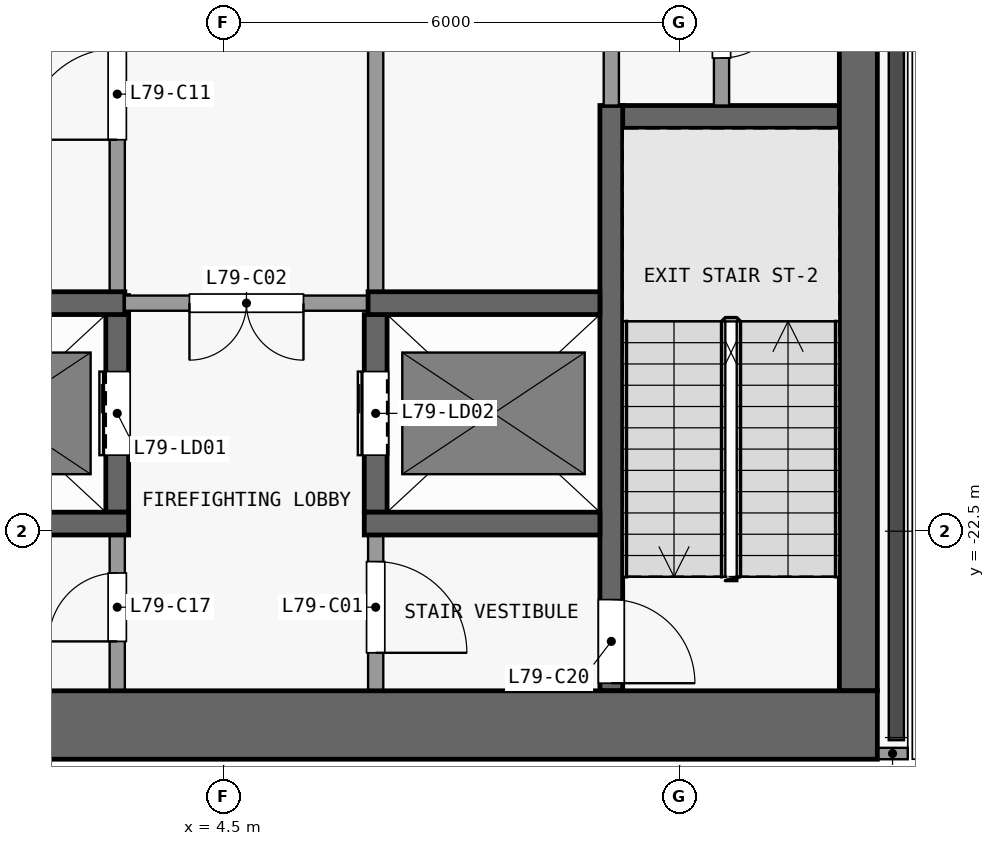
"""IFC4 building model, lengths in metres.
Left out: names, types, materials, properties, quantities, classifications, styles, units other than length and angle.
Written with IfcOpenShell. Run it as: python <this file> out.ifc"""

import sys

from ifc_helpers import new_model, si_unit, direction, frame, frame_2d, origin, place, context, subcontext, project, spatial, rectangle, extrude, element, fill, save


model = new_model("IFC4")
c1 = context("Model", 3, precision=1e-05, world=origin(), true_north=direction((0.0, 1.0)))
c2 = subcontext(c1, "Body", "Model", "MODEL_VIEW")
j1 = project(units=[si_unit("LENGTHUNIT", "METRE"), si_unit("PLANEANGLEUNIT", "RADIAN")], contexts=[c1])
p1 = place(None, origin())
s1 = spatial("IfcSite", under=j1, at=p1, CompositionType="ELEMENT")
p2 = place(p1, origin())
s2 = spatial("IfcBuilding", under=s1, at=p2, CompositionType="ELEMENT")
p3 = place(p2, frame((0.0, 0.0, 312.2)))
s3 = spatial("IfcBuildingStorey", under=s2, at=p3, CompositionType="ELEMENT", Elevation=312.2)
p4 = place(p3, frame((-13.1, -25.05, 0.0), z_axis=(0.0, 0.0, 1.0), x_axis=(1.0, 0.0, 0.0)))
e1 = element("IfcWall", 1, at=p4, inside=s3, PredefinedType="SHEAR", context=c2, shape_type="SweptSolid", body=[
    extrude(rectangle(XDim=26.2, YDim=0.9, at=frame_2d((13.1, 0.0))), origin(), (0.0, 0.0, 1.0), 4.2),
])
p5 = place(p3, frame((12.85, -24.6, 0.0), z_axis=(0.0, 0.0, 1.0), x_axis=(0.0, 1.0, 0.0)))
e2 = element("IfcWall", 2, at=p5, inside=s3, PredefinedType="SHEAR", context=c2, shape_type="SweptSolid", body=[
    extrude(rectangle(XDim=16.1, YDim=0.5, at=frame_2d((8.05, 0.0))), origin(), (0.0, 0.0, 1.0), 4.2),
])
p6 = place(p3, frame((-3.25, -22.4, 0.0), z_axis=(0.0, 0.0, 1.0), x_axis=(1.0, 0.0, 0.0)))
e3 = element("IfcWall", 3, at=p6, inside=s3, PredefinedType="SHEAR", context=c2, shape_type="SweptSolid", body=[
    extrude(rectangle(XDim=6.5, YDim=0.3, at=frame_2d((3.25, 0.0))), origin(), (0.0, 0.0, 1.0), 4.2),
])
p7 = place(p3, frame((6.35, -22.4, 0.0), z_axis=(0.0, 0.0, 1.0), x_axis=(1.0, 0.0, 0.0)))
e4 = element("IfcWall", 4, at=p7, inside=s3, PredefinedType="SHEAR", context=c2, shape_type="SweptSolid", body=[
    extrude(rectangle(XDim=3.1, YDim=0.3, at=frame_2d((1.55, 0.0))), origin(), (0.0, 0.0, 1.0), 4.2),
])
p8 = place(p3, frame((-0.1, -19.5, 0.0), z_axis=(0.0, 0.0, 1.0), x_axis=(1.0, 0.0, 0.0)))
e5 = element("IfcWall", 5, at=p8, inside=s3, PredefinedType="SHEAR", context=c2, shape_type="SweptSolid", body=[
    extrude(rectangle(XDim=3.3, YDim=0.3, at=frame_2d((1.65, 0.0))), origin(), (0.0, 0.0, 1.0), 4.2),
])
p9 = place(p3, frame((6.4, -19.5, 0.0), z_axis=(0.0, 0.0, 1.0), x_axis=(-1.0, 0.0, 0.0)))
e6 = element("IfcWall", 6, at=p9, inside=s3, PredefinedType="PARTITIONING", context=c2, shape_type="SweptSolid", body=[
    extrude(rectangle(XDim=3.2, YDim=0.2, at=frame_2d((1.6, 0.0))), origin(), (0.0, 0.0, 1.0), 4.2),
])
p10 = place(p9, frame((0.85, 0.0, 0.0)))
e7 = element("IfcOpeningElement", 7, at=p10, cuts=e6, PredefinedType="OPENING", context=c2, shape_type="SweptSolid", body=[
    extrude(rectangle(XDim=1.5, YDim=2.1, at=frame_2d((0.75, 1.05))), frame((0.0, 0.11, 0.0), z_axis=(0.0, -1.0, 0.0), x_axis=(1.0, 0.0, 0.0)), (0.0, 0.0, 1.0), 0.22),
])
p11 = place(p3, frame((6.4, -19.5, 0.0), z_axis=(0.0, 0.0, 1.0), x_axis=(1.0, 0.0, 0.0)))
e8 = element("IfcWall", 8, at=p11, inside=s3, PredefinedType="SHEAR", context=c2, shape_type="SweptSolid", body=[
    extrude(rectangle(XDim=3.05, YDim=0.3, at=frame_2d((1.525, 0.0))), origin(), (0.0, 0.0, 1.0), 4.2),
])
p12 = place(p3, frame((9.5, -17.05, 0.0), z_axis=(0.0, 0.0, 1.0), x_axis=(1.0, 0.0, 0.0)))
e9 = element("IfcWall", 9, at=p12, inside=s3, PredefinedType="SHEAR", context=c2, shape_type="SweptSolid", body=[
    extrude(rectangle(XDim=3.1, YDim=0.3, at=frame_2d((1.55, 0.0))), origin(), (0.0, 0.0, 1.0), 4.2),
])
p13 = place(p3, frame((3.1, -24.6, 0.0), z_axis=(0.0, 0.0, 1.0), x_axis=(0.0, 1.0, 0.0)))
e10 = element("IfcWall", 10, at=p13, inside=s3, PredefinedType="PARTITIONING", context=c2, shape_type="SweptSolid", body=[
    extrude(rectangle(XDim=2.05, YDim=0.2, at=frame_2d((1.025, 0.0))), origin(), (0.0, 0.0, 1.0), 4.2),
])
p14 = place(p13, frame((0.65, 0.0, 0.0)))
e11 = element("IfcOpeningElement", 11, at=p14, cuts=e10, PredefinedType="OPENING", context=c2, shape_type="SweptSolid", body=[
    extrude(rectangle(XDim=0.9, YDim=2.1, at=frame_2d((0.45, 1.05))), frame((0.0, 0.11, 0.0), z_axis=(0.0, -1.0, 0.0), x_axis=(1.0, 0.0, 0.0)), (0.0, 0.0, 1.0), 0.22),
])
p15 = place(p3, frame((3.1, -22.25, 0.0), z_axis=(0.0, 0.0, 1.0), x_axis=(0.0, 1.0, 0.0)))
e12 = element("IfcWall", 12, at=p15, inside=s3, PredefinedType="SHEAR", context=c2, shape_type="SweptSolid", body=[
    extrude(rectangle(XDim=2.85, YDim=0.3, at=frame_2d((1.425, 0.0))), origin(), (0.0, 0.0, 1.0), 4.2),
])
p16 = place(p15, frame((0.75, 0.0, 0.0)))
e13 = element("IfcOpeningElement", 13, at=p16, cuts=e12, PredefinedType="OPENING", context=c2, shape_type="SweptSolid", body=[
    extrude(rectangle(XDim=1.1, YDim=2.1, at=frame_2d((0.55, 1.05))), frame((0.0, 0.16, 0.0), z_axis=(0.0, -1.0, 0.0), x_axis=(1.0, 0.0, 0.0)), (0.0, 0.0, 1.0), 0.32),
])
p17 = place(p3, frame((3.1, -19.6, 0.0), z_axis=(0.0, 0.0, 1.0), x_axis=(0.0, 1.0, 0.0)))
e14 = element("IfcWall", 14, at=p17, inside=s3, PredefinedType="PARTITIONING", context=c2, shape_type="SweptSolid", body=[
    extrude(rectangle(XDim=11.1, YDim=0.2, at=frame_2d((5.55, 0.0))), origin(), (0.0, 0.0, 1.0), 4.2),
])
p18 = place(p17, frame((2.25, 0.0, 0.0)))
e15 = element("IfcOpeningElement", 15, at=p18, cuts=e14, PredefinedType="OPENING", context=c2, shape_type="SweptSolid", body=[
    extrude(rectangle(XDim=1.2, YDim=2.1, at=frame_2d((0.6, 1.05))), frame((0.0, 0.11, 0.0), z_axis=(0.0, -1.0, 0.0), x_axis=(1.0, 0.0, 0.0)), (0.0, 0.0, 1.0), 0.22),
])
p19 = place(p17, frame((7.75, 0.0, 0.0)))
e16 = element("IfcOpeningElement", 16, at=p19, cuts=e14, PredefinedType="OPENING", context=c2, shape_type="SweptSolid", body=[
    extrude(rectangle(XDim=1.2, YDim=2.1, at=frame_2d((0.6, 1.05))), frame((0.0, 0.11, 0.0), z_axis=(0.0, -1.0, 0.0), x_axis=(1.0, 0.0, 0.0)), (0.0, 0.0, 1.0), 0.22),
])
p20 = place(p3, frame((6.5, -22.55, 0.0), z_axis=(0.0, 0.0, 1.0), x_axis=(0.0, -1.0, 0.0)))
e17 = element("IfcWall", 17, at=p20, inside=s3, PredefinedType="PARTITIONING", context=c2, shape_type="SweptSolid", body=[
    extrude(rectangle(XDim=2.05, YDim=0.2, at=frame_2d((1.025, 0.0))), origin(), (0.0, 0.0, 1.0), 4.2),
])
p21 = place(p20, frame((0.35, 0.0, 0.0)))
e18 = element("IfcOpeningElement", 18, at=p21, cuts=e17, PredefinedType="OPENING", context=c2, shape_type="SweptSolid", body=[
    extrude(rectangle(XDim=1.2, YDim=2.1, at=frame_2d((0.6, 1.05))), frame((0.0, 0.11, 0.0), z_axis=(0.0, -1.0, 0.0), x_axis=(1.0, 0.0, 0.0)), (0.0, 0.0, 1.0), 0.22),
])
p22 = place(p3, frame((6.5, -22.25, 0.0), z_axis=(0.0, 0.0, 1.0), x_axis=(0.0, 1.0, 0.0)))
e19 = element("IfcWall", 19, at=p22, inside=s3, PredefinedType="SHEAR", context=c2, shape_type="SweptSolid", body=[
    extrude(rectangle(XDim=2.6, YDim=0.3, at=frame_2d((1.3, 0.0))), origin(), (0.0, 0.0, 1.0), 4.2),
])
p23 = place(p22, frame((0.75, 0.0, 0.0)))
e20 = element("IfcOpeningElement", 20, at=p23, cuts=e19, PredefinedType="OPENING", context=c2, shape_type="SweptSolid", body=[
    extrude(rectangle(XDim=1.1, YDim=2.1, at=frame_2d((0.55, 1.05))), frame((0.0, 0.16, 0.0), z_axis=(0.0, -1.0, 0.0), x_axis=(1.0, 0.0, 0.0)), (0.0, 0.0, 1.0), 0.32),
])
p24 = place(p3, frame((6.5, -8.5, 0.0), z_axis=(0.0, 0.0, 1.0), x_axis=(0.0, -1.0, 0.0)))
e21 = element("IfcWall", 21, at=p24, inside=s3, PredefinedType="PARTITIONING", context=c2, shape_type="SweptSolid", body=[
    extrude(rectangle(XDim=10.85, YDim=0.2, at=frame_2d((5.425, 0.0))), origin(), (0.0, 0.0, 1.0), 4.2),
])
p25 = place(p24, frame((6.275, 0.0, 0.0)))
e22 = element("IfcOpeningElement", 22, at=p25, cuts=e21, PredefinedType="OPENING", context=c2, shape_type="SweptSolid", body=[
    extrude(rectangle(XDim=1.2, YDim=2.1, at=frame_2d((0.6, 1.05))), frame((0.0, 0.11, 0.0), z_axis=(0.0, -1.0, 0.0), x_axis=(1.0, 0.0, 0.0)), (0.0, 0.0, 1.0), 0.22),
])
p26 = place(p24, frame((0.925, 0.0, 0.0)))
e23 = element("IfcOpeningElement", 23, at=p26, cuts=e21, PredefinedType="OPENING", context=c2, shape_type="SweptSolid", body=[
    extrude(rectangle(XDim=0.9, YDim=2.1, at=frame_2d((0.45, 1.05))), frame((0.0, 0.11, 0.0), z_axis=(0.0, -1.0, 0.0), x_axis=(1.0, 0.0, 0.0)), (0.0, 0.0, 1.0), 0.22),
])
p27 = place(p3, frame((9.6, -16.9, 0.0), z_axis=(0.0, 0.0, 1.0), x_axis=(0.0, -1.0, 0.0)))
e24 = element("IfcWall", 24, at=p27, inside=s3, PredefinedType="SHEAR", context=c2, shape_type="SweptSolid", body=[
    extrude(rectangle(XDim=7.7, YDim=0.3, at=frame_2d((3.85, 0.0))), origin(), (0.0, 0.0, 1.0), 4.2),
])
p28 = place(p27, frame((6.5, 0.0, 0.0)))
e25 = element("IfcOpeningElement", 25, at=p28, cuts=e24, PredefinedType="OPENING", context=c2, shape_type="SweptSolid", body=[
    extrude(rectangle(XDim=1.1, YDim=2.1, at=frame_2d((0.55, 1.05))), frame((0.0, 0.16, 0.0), z_axis=(0.0, -1.0, 0.0), x_axis=(1.0, 0.0, 0.0)), (0.0, 0.0, 1.0), 0.32),
])
p29 = place(p3, frame((9.6, -16.9, 0.0), z_axis=(0.0, 0.0, 1.0), x_axis=(0.0, 1.0, 0.0)))
e26 = element("IfcWall", 26, at=p29, inside=s3, PredefinedType="PARTITIONING", context=c2, shape_type="SweptSolid", body=[
    extrude(rectangle(XDim=8.4, YDim=0.2, at=frame_2d((4.2, 0.0))), origin(), (0.0, 0.0, 1.0), 4.2),
])
p30 = place(p3, frame((11.05, -14.5, 0.0), z_axis=(0.0, 0.0, 1.0), x_axis=(0.0, -1.0, 0.0)))
e27 = element("IfcWall", 27, at=p30, inside=s3, PredefinedType="PARTITIONING", context=c2, shape_type="SweptSolid", body=[
    extrude(rectangle(XDim=2.4, YDim=0.2, at=frame_2d((1.2, 0.0))), origin(), (0.0, 0.0, 1.0), 4.2),
])
p31 = place(p30, frame((0.875, 0.0, 0.0)))
e28 = element("IfcOpeningElement", 28, at=p31, cuts=e27, PredefinedType="OPENING", context=c2, shape_type="SweptSolid", body=[
    extrude(rectangle(XDim=0.9, YDim=2.1, at=frame_2d((0.45, 1.05))), frame((0.0, 0.11, 0.0), z_axis=(0.0, -1.0, 0.0), x_axis=(1.0, 0.0, 0.0)), (0.0, 0.0, 1.0), 0.22),
])
p32 = place(p3, frame((13.5, -25.425, 0.0), z_axis=(0.0, 0.0, 1.0), x_axis=(-1.0, 0.0, 0.0)))
e29 = element("IfcWall", 29, at=p32, inside=s3, PredefinedType="SOLIDWALL", context=c2, shape_type="SweptSolid", body=[
    extrude(rectangle(XDim=0.4, YDim=0.15, at=frame_2d((0.2, 0.0))), origin(), (0.0, 0.0, 1.0), 4.2),
])
p33 = place(p16, origin())
e30 = element("IfcDoor", 30, at=p33, inside=s3, OperationType="DOUBLE_DOOR_SLIDING", PredefinedType="DOOR", context=c2, shape_type="SweptSolid", body=[
    extrude(rectangle(XDim=1.1, YDim=2.1, at=frame_2d((0.55, 1.05))), frame((0.0, 0.025, 0.0), z_axis=(0.0, -1.0, 0.0), x_axis=(1.0, 0.0, 0.0)), (0.0, 0.0, 1.0), 0.05),
])
fill(e13, e30)
p34 = place(p23, origin())
e31 = element("IfcDoor", 31, at=p34, inside=s3, OperationType="DOUBLE_DOOR_SLIDING", PredefinedType="DOOR", context=c2, shape_type="SweptSolid", body=[
    extrude(rectangle(XDim=1.1, YDim=2.1, at=frame_2d((0.55, 1.05))), frame((0.0, 0.025, 0.0), z_axis=(0.0, -1.0, 0.0), x_axis=(1.0, 0.0, 0.0)), (0.0, 0.0, 1.0), 0.05),
])
fill(e20, e31)
p35 = place(p21, origin())
e32 = element("IfcDoor", 32, at=p35, inside=s3, OperationType="SINGLE_SWING_RIGHT", PredefinedType="DOOR", context=c2, shape_type="SweptSolid", body=[
    extrude(rectangle(XDim=1.2, YDim=2.1, at=frame_2d((0.6, 1.05))), frame((0.0, 0.025, 0.0), z_axis=(0.0, -1.0, 0.0), x_axis=(1.0, 0.0, 0.0)), (0.0, 0.0, 1.0), 0.05),
])
fill(e18, e32)
p36 = place(p10, origin())
e33 = element("IfcDoor", 33, at=p36, inside=s3, OperationType="DOUBLE_DOOR_SINGLE_SWING", PredefinedType="DOOR", context=c2, shape_type="SweptSolid", body=[
    extrude(rectangle(XDim=1.5, YDim=2.1, at=frame_2d((0.75, 1.05))), frame((0.0, 0.025, 0.0), z_axis=(0.0, -1.0, 0.0), x_axis=(1.0, 0.0, 0.0)), (0.0, 0.0, 1.0), 0.05),
])
fill(e7, e33)
p37 = place(p18, origin())
e34 = element("IfcDoor", 34, at=p37, inside=s3, OperationType="SINGLE_SWING_LEFT", PredefinedType="DOOR", context=c2, shape_type="SweptSolid", body=[
    extrude(rectangle(XDim=1.2, YDim=2.1, at=frame_2d((0.6, 1.05))), frame((0.0, 0.025, 0.0), z_axis=(0.0, -1.0, 0.0), x_axis=(1.0, 0.0, 0.0)), (0.0, 0.0, 1.0), 0.05),
])
fill(e15, e34)
p38 = place(p14, origin())
e35 = element("IfcDoor", 35, at=p38, inside=s3, OperationType="SINGLE_SWING_LEFT", PredefinedType="DOOR", context=c2, shape_type="SweptSolid", body=[
    extrude(rectangle(XDim=0.9, YDim=2.1, at=frame_2d((0.45, 1.05))), frame((0.0, 0.025, 0.0), z_axis=(0.0, -1.0, 0.0), x_axis=(1.0, 0.0, 0.0)), (0.0, 0.0, 1.0), 0.05),
])
fill(e11, e35)
p39 = place(p31, origin())
e36 = element("IfcDoor", 36, at=p39, inside=s3, OperationType="SINGLE_SWING_LEFT", PredefinedType="DOOR", context=c2, shape_type="SweptSolid", body=[
    extrude(rectangle(XDim=0.9, YDim=2.1, at=frame_2d((0.45, 1.05))), frame((0.0, 0.025, 0.0), z_axis=(0.0, -1.0, 0.0), x_axis=(1.0, 0.0, 0.0)), (0.0, 0.0, 1.0), 0.05),
])
fill(e28, e36)
p40 = place(p28, origin())
e37 = element("IfcDoor", 37, at=p40, inside=s3, OperationType="SINGLE_SWING_RIGHT", PredefinedType="DOOR", context=c2, shape_type="SweptSolid", body=[
    extrude(rectangle(XDim=1.1, YDim=2.1, at=frame_2d((0.55, 1.05))), frame((0.0, 0.025, 0.0), z_axis=(0.0, -1.0, 0.0), x_axis=(1.0, 0.0, 0.0)), (0.0, 0.0, 1.0), 0.05),
])
fill(e25, e37)
save(model, sys.argv[1])
